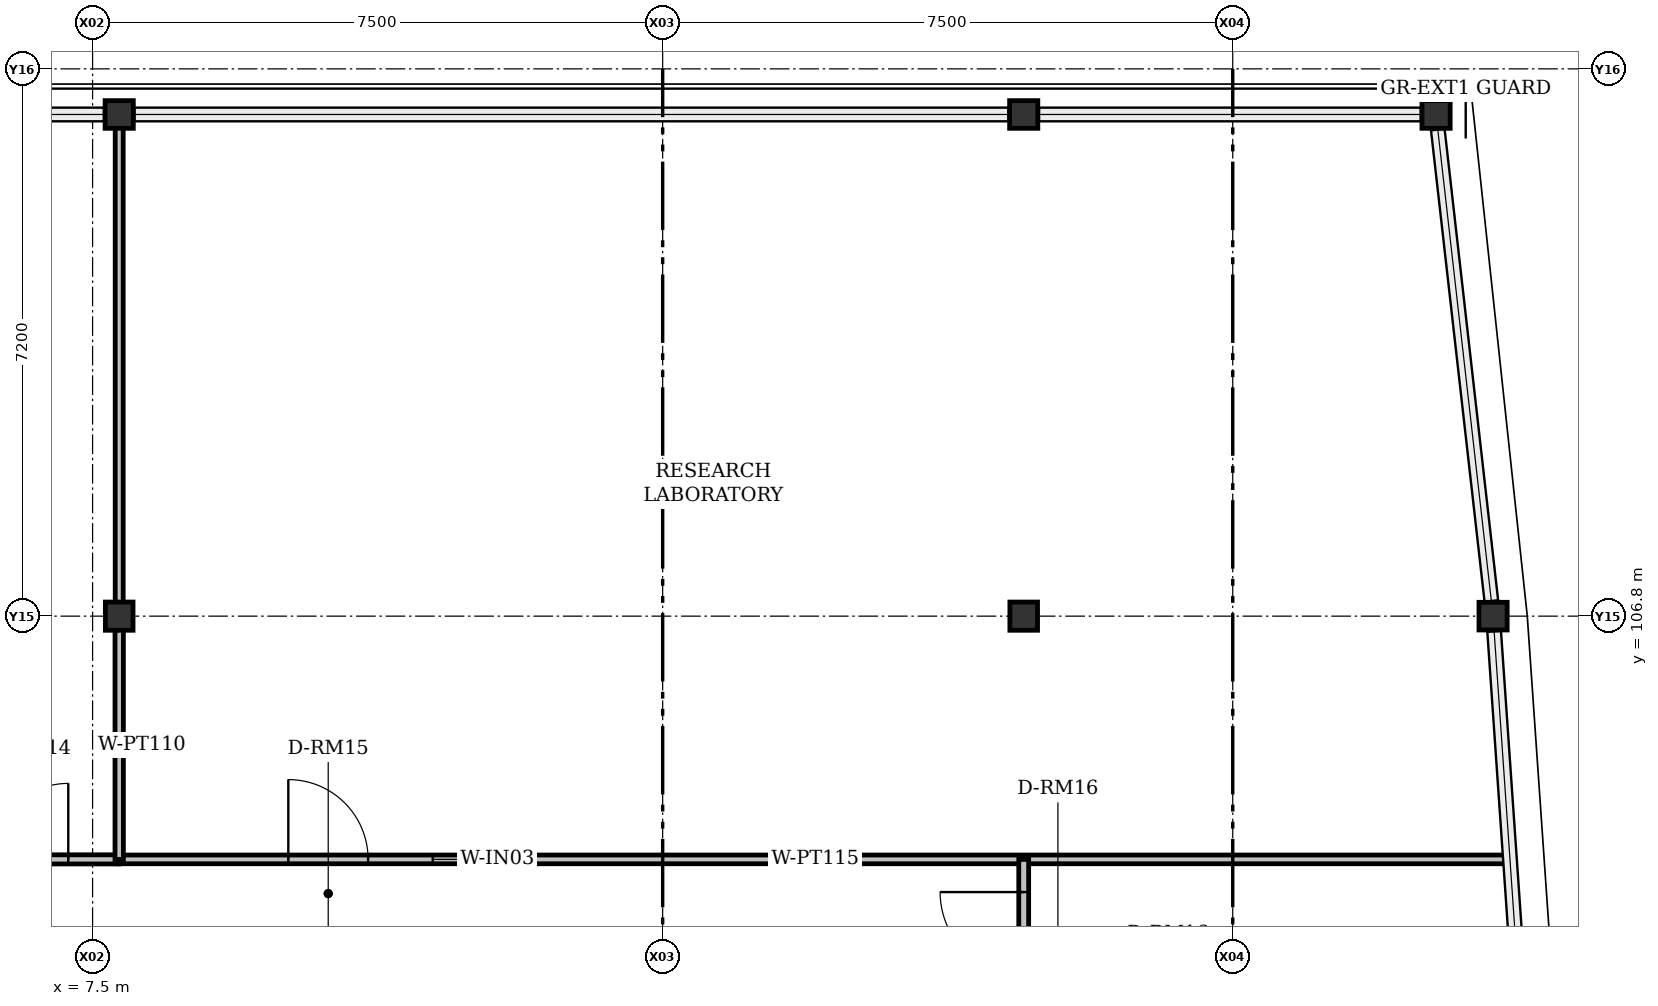
"""IFC4 building model, lengths in metres.
Left out: names, types, materials, properties, quantities, classifications, styles, units other than length and angle.
Written with IfcOpenShell. Run it as: python <this file> out.ifc"""

import sys

from ifc_helpers import new_model, si_unit, direction, frame, frame_2d, origin, origin_2d, place, context, subcontext, project, spatial, rectangle, i_section, extrude, element, fill, save


model = new_model("IFC4")
c1 = context("Model", 3, precision=1e-05, world=origin(), true_north=direction((0.0, 1.0)))
c2 = subcontext(c1, "Body", "Model", "MODEL_VIEW")
j1 = project(units=[si_unit("LENGTHUNIT", "METRE"), si_unit("PLANEANGLEUNIT", "RADIAN")], contexts=[c1])
p1 = place(None, origin())
s1 = spatial("IfcSite", under=j1, at=p1, CompositionType="ELEMENT")
p2 = place(p1, origin())
s2 = spatial("IfcBuilding", under=s1, at=p2, CompositionType="ELEMENT")
p3 = place(p2, frame((0.0, 0.0, 43.5)))
s3 = spatial("IfcBuildingStorey", under=s2, at=p3, CompositionType="ELEMENT", Elevation=43.5)
for number, where, z_axis, x_axis in (
    (1, (7.85, 106.8, 0.0), (0.0, 0.0, 1.0), (0.0, 1.0, 0.0)),
    (2, (19.75, 106.8, 0.0), (0.0, 0.0, 1.0), (0.0, 1.0, 0.0)),
    (3, (25.925, 106.8, 0.0), (0.0, 0.0, 1.0), (1.0, 0.0, 0.0)),
    (4, (7.85, 113.4, 0.0), (0.0, 0.0, 1.0), (1.0, 0.0, 0.0)),
    (5, (19.75, 113.4, 0.0), (0.0, 0.0, 1.0), (1.0, 0.0, 0.0)),
    (6, (25.175, 113.4, 0.0), (0.0, 0.0, 1.0), (1.0, 0.0, 0.0)),
):
    element("IfcColumn", number, at=place(p3, frame(where, z_axis=z_axis, x_axis=x_axis)), inside=s3, PredefinedType="COLUMN", context=c2, shape_type="SweptSolid", body=[
        extrude(i_section(OverallWidth=0.371, OverallDepth=0.364, WebThickness=0.013, FlangeThickness=0.022, FilletRadius=0.015, at=origin_2d()), origin(), (0.0, 0.0, 1.0), 4.2),
    ])
p4 = place(p3, frame((0.65, 103.6, 0.0), z_axis=(0.0, 0.0, 1.0), x_axis=(1.0, 0.0, 0.0)))
e7 = element("IfcWall", 7, at=p4, inside=s3, PredefinedType="PARTITIONING", context=c2, shape_type="SweptSolid", body=[
    extrude(rectangle(XDim=7.2, YDim=0.12, at=frame_2d((3.6, 0.0))), origin(), (0.0, 0.0, 1.0), 3.502),
])
p5 = place(p4, frame((5.53, 0.0, 0.0)))
e8 = element("IfcOpeningElement", 8, at=p5, cuts=e7, PredefinedType="OPENING", context=c2, shape_type="SweptSolid", body=[
    extrude(rectangle(XDim=1.0, YDim=2.2, at=frame_2d((0.5, 1.1))), frame((0.0, 0.06, 0.0), z_axis=(0.0, -1.0, 0.0), x_axis=(1.0, 0.0, 0.0)), (0.0, 0.0, 1.0), 0.12),
])
p6 = place(p3, frame((7.85, 103.6, 0.0), z_axis=(0.0, 0.0, 1.0), x_axis=(1.0, 0.0, 0.0)))
e9 = element("IfcWall", 9, at=p6, inside=s3, PredefinedType="PARTITIONING", context=c2, shape_type="SweptSolid", body=[
    extrude(rectangle(XDim=18.315, YDim=0.115, at=frame_2d((9.157, 0.0))), origin(), (0.0, 0.0, 1.0), 3.502),
])
p7 = place(p6, frame((2.225, 0.0, 0.0)))
e10 = element("IfcOpeningElement", 10, at=p7, cuts=e9, PredefinedType="OPENING", context=c2, shape_type="SweptSolid", body=[
    extrude(rectangle(XDim=1.05, YDim=2.2, at=frame_2d((0.525, 1.1))), frame((0.0, 0.058, 0.0), z_axis=(0.0, -1.0, 0.0), x_axis=(1.0, 0.0, 0.0)), (0.0, 0.0, 1.0), 0.115),
])
p8 = place(p6, frame((4.125, 0.0, 0.92)))
e11 = element("IfcOpeningElement", 11, at=p8, cuts=e9, PredefinedType="OPENING", context=c2, shape_type="SweptSolid", body=[
    extrude(rectangle(XDim=1.1, YDim=1.1, at=frame_2d((0.55, 0.55))), frame((0.0, 0.058, 0.0), z_axis=(0.0, -1.0, 0.0), x_axis=(1.0, 0.0, 0.0)), (0.0, 0.0, 1.0), 0.115),
])
p9 = place(p3, frame((7.85, 106.619, 0.0), z_axis=(0.0, 0.0, 1.0), x_axis=(0.0, -1.0, 0.0)))
e12 = element("IfcWall", 12, at=p9, inside=s3, PredefinedType="PARTITIONING", context=c2, shape_type="SweptSolid", body=[
    extrude(rectangle(XDim=3.019, YDim=0.11, at=frame_2d((1.51, 0.0))), origin(), (0.0, 0.0, 1.0), 3.502),
])
p10 = place(p3, frame((7.85, 113.35, 0.0), z_axis=(0.0, 0.0, 1.0), x_axis=(0.0, -1.0, 0.0)))
e13 = element("IfcWall", 13, at=p10, inside=s3, PredefinedType="PARTITIONING", context=c2, shape_type="SweptSolid", body=[
    extrude(rectangle(XDim=6.37, YDim=0.105, at=frame_2d((3.185, 0.0))), origin(), (0.0, 0.0, 1.0), 3.502),
])
p11 = place(p3, frame((19.75, 99.777, 0.0), z_axis=(0.0, 0.0, 1.0), x_axis=(0.0, 1.0, 0.0)))
e14 = element("IfcWall", 14, at=p11, inside=s3, PredefinedType="PARTITIONING", context=c2, shape_type="SweptSolid", body=[
    extrude(rectangle(XDim=3.823, YDim=0.13, at=frame_2d((1.912, 0.0))), origin(), (0.0, 0.0, 1.0), 3.502),
])
p12 = place(p11, frame((2.293, 0.0, 0.0)))
e15 = element("IfcOpeningElement", 15, at=p12, cuts=e14, PredefinedType="OPENING", context=c2, shape_type="SweptSolid", body=[
    extrude(rectangle(XDim=1.1, YDim=2.2, at=frame_2d((0.55, 1.1))), frame((0.0, 0.065, 0.0), z_axis=(0.0, -1.0, 0.0), x_axis=(1.0, 0.0, 0.0)), (0.0, 0.0, 1.0), 0.13),
])
p13 = place(p5, origin())
e16 = element("IfcDoor", 16, at=p13, inside=s3, OperationType="SINGLE_SWING_RIGHT", PredefinedType="DOOR", context=c2, shape_type="SweptSolid", body=[
    extrude(rectangle(XDim=1.0, YDim=2.2, at=frame_2d((0.5, 1.1))), frame((0.0, 0.025, 0.0), z_axis=(0.0, -1.0, 0.0), x_axis=(1.0, 0.0, 0.0)), (0.0, 0.0, 1.0), 0.05),
])
fill(e8, e16)
p14 = place(p7, origin())
e17 = element("IfcDoor", 17, at=p14, inside=s3, OperationType="SINGLE_SWING_LEFT", PredefinedType="DOOR", context=c2, shape_type="SweptSolid", body=[
    extrude(rectangle(XDim=1.05, YDim=2.2, at=frame_2d((0.525, 1.1))), frame((0.0, 0.025, 0.0), z_axis=(0.0, -1.0, 0.0), x_axis=(1.0, 0.0, 0.0)), (0.0, 0.0, 1.0), 0.05),
])
fill(e10, e17)
p15 = place(p8, origin())
e18 = element("IfcWindow", 18, at=p15, inside=s3, PartitioningType="SINGLE_PANEL", PredefinedType="WINDOW", context=c2, shape_type="SweptSolid", body=[
    extrude(rectangle(XDim=1.1, YDim=1.1, at=frame_2d((0.55, 0.55))), frame((0.0, 0.03, 0.0), z_axis=(0.0, -1.0, 0.0), x_axis=(1.0, 0.0, 0.0)), (0.0, 0.0, 1.0), 0.06),
])
fill(e11, e18)
p16 = place(p12, origin())
e19 = element("IfcDoor", 19, at=p16, inside=s3, OperationType="SINGLE_SWING_RIGHT", PredefinedType="DOOR", context=c2, shape_type="SweptSolid", body=[
    extrude(rectangle(XDim=1.1, YDim=2.2, at=frame_2d((0.55, 1.1))), frame((0.0, 0.025, 0.0), z_axis=(0.0, -1.0, 0.0), x_axis=(1.0, 0.0, 0.0)), (0.0, 0.0, 1.0), 0.05),
])
fill(e15, e19)
save(model, sys.argv[1])
